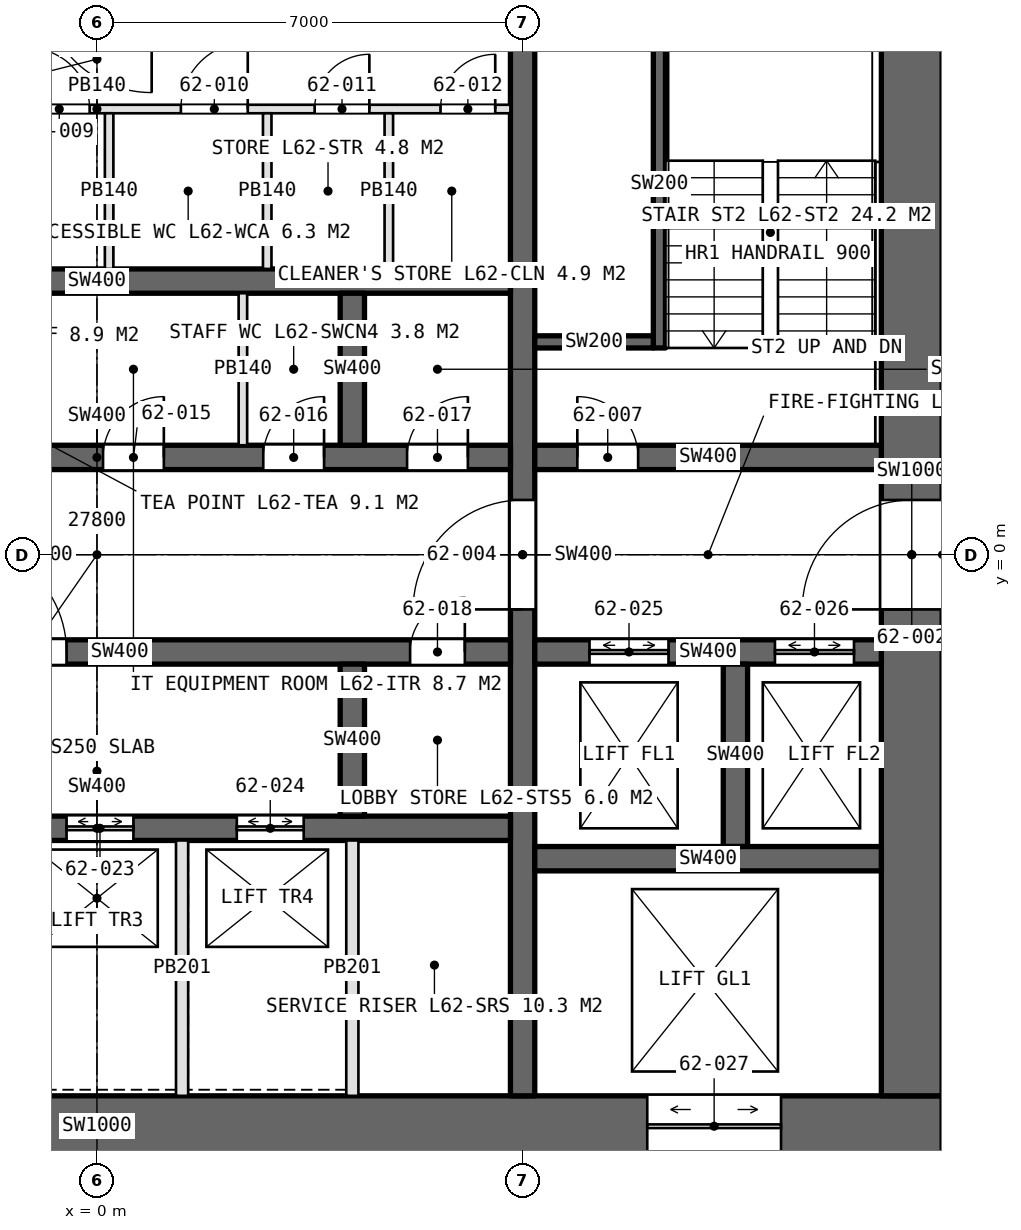
"""IFC4 building model, lengths in metres.
Left out: names, types, materials, properties, quantities, classifications, styles, units other than length and angle.
Written with IfcOpenShell. Run it as: python <this file> out.ifc"""

import sys

from ifc_helpers import new_model, si_unit, direction, frame, frame_2d, origin, place, context, subcontext, project, spatial, rectangle, extrude, element, fill, save


model = new_model("IFC4")
c1 = context("Model", 3, precision=1e-05, world=origin(), true_north=direction((0.0, 1.0)))
c2 = subcontext(c1, "Body", "Model", "MODEL_VIEW")
j1 = project(units=[si_unit("LENGTHUNIT", "METRE"), si_unit("PLANEANGLEUNIT", "RADIAN")], contexts=[c1])
p1 = place(None, origin())
s1 = spatial("IfcSite", under=j1, at=p1, CompositionType="ELEMENT")
p2 = place(p1, origin())
s2 = spatial("IfcBuilding", under=s1, at=p2, CompositionType="ELEMENT")
p3 = place(p2, frame((0.0, 0.0, 279.6)))
s3 = spatial("IfcBuildingStorey", under=s2, at=p3, CompositionType="ELEMENT", Elevation=279.6)
p4 = place(p3, frame((-13.9, -9.4, 0.0), z_axis=(0.0, 0.0, 1.0), x_axis=(1.0, 0.0, 0.0)))
e1 = element("IfcWall", 1, at=p4, inside=s3, PredefinedType="SHEAR", context=c2, shape_type="SweptSolid", body=[
    extrude(rectangle(XDim=27.8, YDim=1.0, at=frame_2d((13.9, 0.0))), origin(), (0.0, 0.0, 1.0), 4.2),
])
p5 = place(p4, frame((22.95, 0.0, 0.0)))
e2 = element("IfcOpeningElement", 2, at=p5, cuts=e1, PredefinedType="OPENING", context=c2, shape_type="SweptSolid", body=[
    extrude(rectangle(XDim=2.2, YDim=2.7, at=frame_2d((1.1, 1.35))), frame((0.0, 0.51, 0.0), z_axis=(0.0, -1.0, 0.0), x_axis=(1.0, 0.0, 0.0)), (0.0, 0.0, 1.0), 1.02),
])
p6 = place(p3, frame((13.4, -8.9, 0.0), z_axis=(0.0, 0.0, 1.0), x_axis=(0.0, 1.0, 0.0)))
e3 = element("IfcWall", 3, at=p6, inside=s3, PredefinedType="SHEAR", context=c2, shape_type="SweptSolid", body=[
    extrude(rectangle(XDim=17.8, YDim=1.0, at=frame_2d((8.9, 0.0))), origin(), (0.0, 0.0, 1.0), 4.2),
])
p7 = place(p6, frame((8.0, 0.0, 0.0)))
e4 = element("IfcOpeningElement", 4, at=p7, cuts=e3, PredefinedType="OPENING", context=c2, shape_type="SweptSolid", body=[
    extrude(rectangle(XDim=1.8, YDim=2.4, at=frame_2d((0.9, 1.2))), frame((0.0, 0.51, 0.0), z_axis=(0.0, -1.0, 0.0), x_axis=(1.0, 0.0, 0.0)), (0.0, 0.0, 1.0), 1.02),
])
p8 = place(p3, frame((7.0, -8.9, 0.0), z_axis=(0.0, 0.0, 1.0), x_axis=(0.0, 1.0, 0.0)))
e5 = element("IfcWall", 5, at=p8, inside=s3, PredefinedType="SHEAR", context=c2, shape_type="SweptSolid", body=[
    extrude(rectangle(XDim=17.8, YDim=0.4, at=frame_2d((8.9, 0.0))), origin(), (0.0, 0.0, 1.0), 4.2),
])
p9 = place(p8, frame((8.0, 0.0, 0.0)))
e6 = element("IfcOpeningElement", 6, at=p9, cuts=e5, PredefinedType="OPENING", context=c2, shape_type="SweptSolid", body=[
    extrude(rectangle(XDim=1.8, YDim=2.4, at=frame_2d((0.9, 1.2))), frame((0.0, 0.21, 0.0), z_axis=(0.0, -1.0, 0.0), x_axis=(1.0, 0.0, 0.0)), (0.0, 0.0, 1.0), 0.42),
])
p10 = place(p3, frame((-6.8, 1.6, 0.0), z_axis=(0.0, 0.0, 1.0), x_axis=(1.0, 0.0, 0.0)))
e7 = element("IfcWall", 7, at=p10, inside=s3, PredefinedType="SHEAR", context=c2, shape_type="SweptSolid", body=[
    extrude(rectangle(XDim=13.6, YDim=0.4, at=frame_2d((6.8, 0.0))), origin(), (0.0, 0.0, 1.0), 4.2),
])
p11 = place(p10, frame((0.365, 0.0, 0.0)))
e8 = element("IfcOpeningElement", 8, at=p11, cuts=e7, PredefinedType="OPENING", context=c2, shape_type="SweptSolid", body=[
    extrude(rectangle(XDim=1.0, YDim=2.4, at=frame_2d((0.5, 1.2))), frame((0.0, 0.21, 0.0), z_axis=(0.0, -1.0, 0.0), x_axis=(1.0, 0.0, 0.0)), (0.0, 0.0, 1.0), 0.42),
])
p12 = place(p10, frame((3.2, 0.0, 0.0)))
e9 = element("IfcOpeningElement", 9, at=p12, cuts=e7, PredefinedType="OPENING", context=c2, shape_type="SweptSolid", body=[
    extrude(rectangle(XDim=1.0, YDim=2.4, at=frame_2d((0.5, 1.2))), frame((0.0, 0.21, 0.0), z_axis=(0.0, -1.0, 0.0), x_axis=(1.0, 0.0, 0.0)), (0.0, 0.0, 1.0), 0.42),
])
p13 = place(p10, frame((6.9, 0.0, 0.0)))
e10 = element("IfcOpeningElement", 10, at=p13, cuts=e7, PredefinedType="OPENING", context=c2, shape_type="SweptSolid", body=[
    extrude(rectangle(XDim=1.0, YDim=2.4, at=frame_2d((0.5, 1.2))), frame((0.0, 0.21, 0.0), z_axis=(0.0, -1.0, 0.0), x_axis=(1.0, 0.0, 0.0)), (0.0, 0.0, 1.0), 0.42),
])
p14 = place(p10, frame((9.535, 0.0, 0.0)))
e11 = element("IfcOpeningElement", 11, at=p14, cuts=e7, PredefinedType="OPENING", context=c2, shape_type="SweptSolid", body=[
    extrude(rectangle(XDim=1.0, YDim=2.4, at=frame_2d((0.5, 1.2))), frame((0.0, 0.21, 0.0), z_axis=(0.0, -1.0, 0.0), x_axis=(1.0, 0.0, 0.0)), (0.0, 0.0, 1.0), 0.42),
])
p15 = place(p10, frame((11.9, 0.0, 0.0)))
e12 = element("IfcOpeningElement", 12, at=p15, cuts=e7, PredefinedType="OPENING", context=c2, shape_type="SweptSolid", body=[
    extrude(rectangle(XDim=1.0, YDim=2.4, at=frame_2d((0.5, 1.2))), frame((0.0, 0.21, 0.0), z_axis=(0.0, -1.0, 0.0), x_axis=(1.0, 0.0, 0.0)), (0.0, 0.0, 1.0), 0.42),
])
p16 = place(p3, frame((-6.8, -1.6, 0.0), z_axis=(0.0, 0.0, 1.0), x_axis=(1.0, 0.0, 0.0)))
e13 = element("IfcWall", 13, at=p16, inside=s3, PredefinedType="SHEAR", context=c2, shape_type="SweptSolid", body=[
    extrude(rectangle(XDim=13.6, YDim=0.4, at=frame_2d((6.8, 0.0))), origin(), (0.0, 0.0, 1.0), 4.2),
])
p17 = place(p16, frame((11.95, 0.0, 0.0)))
e14 = element("IfcOpeningElement", 14, at=p17, cuts=e13, PredefinedType="OPENING", context=c2, shape_type="SweptSolid", body=[
    extrude(rectangle(XDim=0.9, YDim=2.4, at=frame_2d((0.45, 1.2))), frame((0.0, 0.21, 0.0), z_axis=(0.0, -1.0, 0.0), x_axis=(1.0, 0.0, 0.0)), (0.0, 0.0, 1.0), 0.42),
])
p18 = place(p16, frame((4.5, 0.0, 0.0)))
e15 = element("IfcOpeningElement", 15, at=p18, cuts=e13, PredefinedType="OPENING", context=c2, shape_type="SweptSolid", body=[
    extrude(rectangle(XDim=1.8, YDim=2.4, at=frame_2d((0.9, 1.2))), frame((0.0, 0.21, 0.0), z_axis=(0.0, -1.0, 0.0), x_axis=(1.0, 0.0, 0.0)), (0.0, 0.0, 1.0), 0.42),
])
p19 = place(p3, frame((-6.8, 4.5, 0.0), z_axis=(0.0, 0.0, 1.0), x_axis=(1.0, 0.0, 0.0)))
e16 = element("IfcWall", 16, at=p19, inside=s3, PredefinedType="SHEAR", context=c2, shape_type="SweptSolid", body=[
    extrude(rectangle(XDim=13.6, YDim=0.4, at=frame_2d((6.8, 0.0))), origin(), (0.0, 0.0, 1.0), 4.2),
])
p20 = place(p3, frame((-6.8, -4.5, 0.0), z_axis=(0.0, 0.0, 1.0), x_axis=(1.0, 0.0, 0.0)))
e17 = element("IfcWall", 17, at=p20, inside=s3, PredefinedType="SHEAR", context=c2, shape_type="SweptSolid", body=[
    extrude(rectangle(XDim=13.6, YDim=0.4, at=frame_2d((6.8, 0.0))), origin(), (0.0, 0.0, 1.0), 4.2),
])
p21 = place(p20, frame((0.7, 0.0, 0.0)))
e18 = element("IfcOpeningElement", 18, at=p21, cuts=e17, PredefinedType="OPENING", context=c2, shape_type="SweptSolid", body=[
    extrude(rectangle(XDim=1.1, YDim=2.4, at=frame_2d((0.55, 1.2))), frame((0.0, 0.21, 0.0), z_axis=(0.0, -1.0, 0.0), x_axis=(1.0, 0.0, 0.0)), (0.0, 0.0, 1.0), 0.42),
])
p22 = place(p20, frame((3.5, 0.0, 0.0)))
e19 = element("IfcOpeningElement", 19, at=p22, cuts=e17, PredefinedType="OPENING", context=c2, shape_type="SweptSolid", body=[
    extrude(rectangle(XDim=1.1, YDim=2.4, at=frame_2d((0.55, 1.2))), frame((0.0, 0.21, 0.0), z_axis=(0.0, -1.0, 0.0), x_axis=(1.0, 0.0, 0.0)), (0.0, 0.0, 1.0), 0.42),
])
p23 = place(p20, frame((6.3, 0.0, 0.0)))
e20 = element("IfcOpeningElement", 20, at=p23, cuts=e17, PredefinedType="OPENING", context=c2, shape_type="SweptSolid", body=[
    extrude(rectangle(XDim=1.1, YDim=2.4, at=frame_2d((0.55, 1.2))), frame((0.0, 0.21, 0.0), z_axis=(0.0, -1.0, 0.0), x_axis=(1.0, 0.0, 0.0)), (0.0, 0.0, 1.0), 0.42),
])
p24 = place(p20, frame((9.1, 0.0, 0.0)))
e21 = element("IfcOpeningElement", 21, at=p24, cuts=e17, PredefinedType="OPENING", context=c2, shape_type="SweptSolid", body=[
    extrude(rectangle(XDim=1.1, YDim=2.4, at=frame_2d((0.55, 1.2))), frame((0.0, 0.21, 0.0), z_axis=(0.0, -1.0, 0.0), x_axis=(1.0, 0.0, 0.0)), (0.0, 0.0, 1.0), 0.42),
])
p25 = place(p3, frame((7.2, 1.6, 0.0), z_axis=(0.0, 0.0, 1.0), x_axis=(1.0, 0.0, 0.0)))
e22 = element("IfcWall", 22, at=p25, inside=s3, PredefinedType="SHEAR", context=c2, shape_type="SweptSolid", body=[
    extrude(rectangle(XDim=5.7, YDim=0.4, at=frame_2d((2.85, 0.0))), origin(), (0.0, 0.0, 1.0), 4.2),
])
p26 = place(p25, frame((0.7, 0.0, 0.0)))
e23 = element("IfcOpeningElement", 23, at=p26, cuts=e22, PredefinedType="OPENING", context=c2, shape_type="SweptSolid", body=[
    extrude(rectangle(XDim=1.0, YDim=2.4, at=frame_2d((0.5, 1.2))), frame((0.0, 0.21, 0.0), z_axis=(0.0, -1.0, 0.0), x_axis=(1.0, 0.0, 0.0)), (0.0, 0.0, 1.0), 0.42),
])
p27 = place(p3, frame((7.2, -1.6, 0.0), z_axis=(0.0, 0.0, 1.0), x_axis=(1.0, 0.0, 0.0)))
e24 = element("IfcWall", 24, at=p27, inside=s3, PredefinedType="SHEAR", context=c2, shape_type="SweptSolid", body=[
    extrude(rectangle(XDim=5.7, YDim=0.4, at=frame_2d((2.85, 0.0))), origin(), (0.0, 0.0, 1.0), 4.2),
])
p28 = place(p27, frame((0.9, 0.0, 0.0)))
e25 = element("IfcOpeningElement", 25, at=p28, cuts=e24, PredefinedType="OPENING", context=c2, shape_type="SweptSolid", body=[
    extrude(rectangle(XDim=1.3, YDim=2.4, at=frame_2d((0.65, 1.2))), frame((0.0, 0.21, 0.0), z_axis=(0.0, -1.0, 0.0), x_axis=(1.0, 0.0, 0.0)), (0.0, 0.0, 1.0), 0.42),
])
p29 = place(p27, frame((3.95, 0.0, 0.0)))
e26 = element("IfcOpeningElement", 26, at=p29, cuts=e24, PredefinedType="OPENING", context=c2, shape_type="SweptSolid", body=[
    extrude(rectangle(XDim=1.3, YDim=2.4, at=frame_2d((0.65, 1.2))), frame((0.0, 0.21, 0.0), z_axis=(0.0, -1.0, 0.0), x_axis=(1.0, 0.0, 0.0)), (0.0, 0.0, 1.0), 0.42),
])
p30 = place(p3, frame((10.5, -4.8, 0.0), z_axis=(0.0, 0.0, 1.0), x_axis=(0.0, 1.0, 0.0)))
e27 = element("IfcWall", 27, at=p30, inside=s3, PredefinedType="SHEAR", context=c2, shape_type="SweptSolid", body=[
    extrude(rectangle(XDim=3.0, YDim=0.4, at=frame_2d((1.5, 0.0))), origin(), (0.0, 0.0, 1.0), 4.2),
])
p31 = place(p3, frame((7.2, -5.0, 0.0), z_axis=(0.0, 0.0, 1.0), x_axis=(1.0, 0.0, 0.0)))
e28 = element("IfcWall", 28, at=p31, inside=s3, PredefinedType="SHEAR", context=c2, shape_type="SweptSolid", body=[
    extrude(rectangle(XDim=5.7, YDim=0.4, at=frame_2d((2.85, 0.0))), origin(), (0.0, 0.0, 1.0), 4.2),
])
for number, where, z_axis, x_axis in (
    (29, (4.2, 1.8, 0.0), (0.0, 0.0, 1.0), (0.0, 1.0, 0.0)),
    (30, (4.2, -4.3, 0.0), (0.0, 0.0, 1.0), (0.0, 1.0, 0.0)),
):
    element("IfcWall", number, at=place(p3, frame(where, z_axis=z_axis, x_axis=x_axis)), inside=s3, PredefinedType="SHEAR", context=c2, shape_type="SweptSolid", body=[
        extrude(rectangle(XDim=2.5, YDim=0.4, at=frame_2d((1.25, 0.0))), origin(), (0.0, 0.0, 1.0), 4.2),
    ])
p32 = place(p3, frame((-6.8, 7.33, 0.0), z_axis=(0.0, 0.0, 1.0), x_axis=(1.0, 0.0, 0.0)))
e31 = element("IfcWall", 31, at=p32, inside=s3, PredefinedType="PARTITIONING", context=c2, shape_type="SweptSolid", body=[
    extrude(rectangle(XDim=13.6, YDim=0.14, at=frame_2d((6.8, 0.0))), origin(), (0.0, 0.0, 1.0), 3.95),
])
p33 = place(p32, frame((2.08, 0.0, 0.0)))
e32 = element("IfcOpeningElement", 32, at=p33, cuts=e31, PredefinedType="OPENING", context=c2, shape_type="SweptSolid", body=[
    extrude(rectangle(XDim=1.0, YDim=2.4, at=frame_2d((0.5, 1.2))), frame((0.0, 0.08, 0.0), z_axis=(0.0, -1.0, 0.0), x_axis=(1.0, 0.0, 0.0)), (0.0, 0.0, 1.0), 0.16),
])
p34 = place(p32, frame((5.68, 0.0, 0.0)))
e33 = element("IfcOpeningElement", 33, at=p34, cuts=e31, PredefinedType="OPENING", context=c2, shape_type="SweptSolid", body=[
    extrude(rectangle(XDim=1.0, YDim=2.4, at=frame_2d((0.5, 1.2))), frame((0.0, 0.08, 0.0), z_axis=(0.0, -1.0, 0.0), x_axis=(1.0, 0.0, 0.0)), (0.0, 0.0, 1.0), 0.16),
])
p35 = place(p32, frame((8.18, 0.0, 0.0)))
e34 = element("IfcOpeningElement", 34, at=p35, cuts=e31, PredefinedType="OPENING", context=c2, shape_type="SweptSolid", body=[
    extrude(rectangle(XDim=1.1, YDim=2.4, at=frame_2d((0.55, 1.2))), frame((0.0, 0.08, 0.0), z_axis=(0.0, -1.0, 0.0), x_axis=(1.0, 0.0, 0.0)), (0.0, 0.0, 1.0), 0.16),
])
p36 = place(p32, frame((10.38, 0.0, 0.0)))
e35 = element("IfcOpeningElement", 35, at=p36, cuts=e31, PredefinedType="OPENING", context=c2, shape_type="SweptSolid", body=[
    extrude(rectangle(XDim=0.9, YDim=2.4, at=frame_2d((0.45, 1.2))), frame((0.0, 0.08, 0.0), z_axis=(0.0, -1.0, 0.0), x_axis=(1.0, 0.0, 0.0)), (0.0, 0.0, 1.0), 0.16),
])
p37 = place(p32, frame((12.45, 0.0, 0.0)))
e36 = element("IfcOpeningElement", 36, at=p37, cuts=e31, PredefinedType="OPENING", context=c2, shape_type="SweptSolid", body=[
    extrude(rectangle(XDim=0.9, YDim=2.4, at=frame_2d((0.45, 1.2))), frame((0.0, 0.08, 0.0), z_axis=(0.0, -1.0, 0.0), x_axis=(1.0, 0.0, 0.0)), (0.0, 0.0, 1.0), 0.16),
])
for number, where, z_axis, x_axis in (
    (37, (0.2, 4.7, 0.0), (0.0, 0.0, 1.0), (0.0, 1.0, 0.0)),
    (38, (2.8, 4.7, 0.0), (0.0, 0.0, 1.0), (0.0, 1.0, 0.0)),
    (39, (4.8, 4.7, 0.0), (0.0, 0.0, 1.0), (0.0, 1.0, 0.0)),
):
    element("IfcWall", number, at=place(p3, frame(where, z_axis=z_axis, x_axis=x_axis)), inside=s3, PredefinedType="PARTITIONING", context=c2, shape_type="SweptSolid", body=[
        extrude(rectangle(XDim=2.56, YDim=0.14, at=frame_2d((1.28, 0.0))), origin(), (0.0, 0.0, 1.0), 3.95),
    ])
p38 = place(p3, frame((2.4, 1.8, 0.0), z_axis=(0.0, 0.0, 1.0), x_axis=(0.0, 1.0, 0.0)))
e40 = element("IfcWall", 40, at=p38, inside=s3, PredefinedType="PARTITIONING", context=c2, shape_type="SweptSolid", body=[
    extrude(rectangle(XDim=2.5, YDim=0.14, at=frame_2d((1.25, 0.0))), origin(), (0.0, 0.0, 1.0), 3.95),
])
for number, where, z_axis, x_axis in (
    (41, (1.4, -4.7, 0.0), (0.0, 0.0, 1.0), (0.0, -1.0, 0.0)),
    (42, (4.2, -4.7, 0.0), (0.0, 0.0, 1.0), (0.0, -1.0, 0.0)),
):
    element("IfcWall", number, at=place(p3, frame(where, z_axis=z_axis, x_axis=x_axis)), inside=s3, PredefinedType="PARTITIONING", context=c2, shape_type="SweptSolid", body=[
        extrude(rectangle(XDim=4.2, YDim=0.2, at=frame_2d((2.1, 0.0))), origin(), (0.0, 0.0, 1.0), 4.2),
    ])
p39 = place(p3, frame((9.25, 3.4, 0.0), z_axis=(0.0, 0.0, 1.0), x_axis=(0.0, 1.0, 0.0)))
e43 = element("IfcWall", 43, at=p39, inside=s3, PredefinedType="SOLIDWALL", context=c2, shape_type="SweptSolid", body=[
    extrude(rectangle(XDim=5.4, YDim=0.2, at=frame_2d((2.7, 0.0))), origin(), (0.0, 0.0, 1.0), 4.2),
])
p40 = place(p3, frame((9.15, 3.5, 0.0), z_axis=(0.0, 0.0, 1.0), x_axis=(-1.0, 0.0, 0.0)))
e44 = element("IfcWall", 44, at=p40, inside=s3, PredefinedType="SOLIDWALL", context=c2, shape_type="SweptSolid", body=[
    extrude(rectangle(XDim=1.95, YDim=0.2, at=frame_2d((0.975, 0.0))), origin(), (0.0, 0.0, 1.0), 4.2),
])
p41 = place(p7, origin())
e45 = element("IfcDoor", 45, at=p41, inside=s3, OperationType="DOUBLE_DOOR_SINGLE_SWING", PredefinedType="DOOR", context=c2, shape_type="SweptSolid", body=[
    extrude(rectangle(XDim=1.8, YDim=2.4, at=frame_2d((0.9, 1.2))), frame((0.0, 0.025, 0.0), z_axis=(0.0, -1.0, 0.0), x_axis=(1.0, 0.0, 0.0)), (0.0, 0.0, 1.0), 0.05),
])
fill(e4, e45)
p42 = place(p9, origin())
e46 = element("IfcDoor", 46, at=p42, inside=s3, OperationType="DOUBLE_DOOR_SINGLE_SWING", PredefinedType="DOOR", context=c2, shape_type="SweptSolid", body=[
    extrude(rectangle(XDim=1.8, YDim=2.4, at=frame_2d((0.9, 1.2))), frame((0.0, 0.025, 0.0), z_axis=(0.0, -1.0, 0.0), x_axis=(1.0, 0.0, 0.0)), (0.0, 0.0, 1.0), 0.05),
])
fill(e6, e46)
p43 = place(p26, origin())
e47 = element("IfcDoor", 47, at=p43, inside=s3, OperationType="SINGLE_SWING_LEFT", PredefinedType="DOOR", context=c2, shape_type="SweptSolid", body=[
    extrude(rectangle(XDim=1.0, YDim=2.4, at=frame_2d((0.5, 1.2))), frame((0.0, 0.025, 0.0), z_axis=(0.0, -1.0, 0.0), x_axis=(1.0, 0.0, 0.0)), (0.0, 0.0, 1.0), 0.05),
])
fill(e23, e47)
p44 = place(p34, origin())
e48 = element("IfcDoor", 48, at=p44, inside=s3, OperationType="SINGLE_SWING_LEFT", PredefinedType="DOOR", context=c2, shape_type="SweptSolid", body=[
    extrude(rectangle(XDim=1.0, YDim=2.4, at=frame_2d((0.5, 1.2))), frame((0.0, 0.025, 0.0), z_axis=(0.0, -1.0, 0.0), x_axis=(1.0, 0.0, 0.0)), (0.0, 0.0, 1.0), 0.05),
])
fill(e33, e48)
p45 = place(p35, origin())
e49 = element("IfcDoor", 49, at=p45, inside=s3, OperationType="SINGLE_SWING_RIGHT", PredefinedType="DOOR", context=c2, shape_type="SweptSolid", body=[
    extrude(rectangle(XDim=1.1, YDim=2.4, at=frame_2d((0.55, 1.2))), frame((0.0, 0.025, 0.0), z_axis=(0.0, -1.0, 0.0), x_axis=(1.0, 0.0, 0.0)), (0.0, 0.0, 1.0), 0.05),
])
fill(e34, e49)
p46 = place(p36, origin())
e50 = element("IfcDoor", 50, at=p46, inside=s3, OperationType="SINGLE_SWING_RIGHT", PredefinedType="DOOR", context=c2, shape_type="SweptSolid", body=[
    extrude(rectangle(XDim=0.9, YDim=2.4, at=frame_2d((0.45, 1.2))), frame((0.0, 0.025, 0.0), z_axis=(0.0, -1.0, 0.0), x_axis=(1.0, 0.0, 0.0)), (0.0, 0.0, 1.0), 0.05),
])
fill(e35, e50)
p47 = place(p37, origin())
e51 = element("IfcDoor", 51, at=p47, inside=s3, OperationType="SINGLE_SWING_RIGHT", PredefinedType="DOOR", context=c2, shape_type="SweptSolid", body=[
    extrude(rectangle(XDim=0.9, YDim=2.4, at=frame_2d((0.45, 1.2))), frame((0.0, 0.025, 0.0), z_axis=(0.0, -1.0, 0.0), x_axis=(1.0, 0.0, 0.0)), (0.0, 0.0, 1.0), 0.05),
])
fill(e36, e51)
p48 = place(p13, origin())
e52 = element("IfcDoor", 52, at=p48, inside=s3, OperationType="SINGLE_SWING_RIGHT", PredefinedType="DOOR", context=c2, shape_type="SweptSolid", body=[
    extrude(rectangle(XDim=1.0, YDim=2.4, at=frame_2d((0.5, 1.2))), frame((0.0, 0.025, 0.0), z_axis=(0.0, -1.0, 0.0), x_axis=(1.0, 0.0, 0.0)), (0.0, 0.0, 1.0), 0.05),
])
fill(e10, e52)
p49 = place(p14, origin())
e53 = element("IfcDoor", 53, at=p49, inside=s3, OperationType="SINGLE_SWING_RIGHT", PredefinedType="DOOR", context=c2, shape_type="SweptSolid", body=[
    extrude(rectangle(XDim=1.0, YDim=2.4, at=frame_2d((0.5, 1.2))), frame((0.0, 0.025, 0.0), z_axis=(0.0, -1.0, 0.0), x_axis=(1.0, 0.0, 0.0)), (0.0, 0.0, 1.0), 0.05),
])
fill(e11, e53)
p50 = place(p15, origin())
e54 = element("IfcDoor", 54, at=p50, inside=s3, OperationType="SINGLE_SWING_RIGHT", PredefinedType="DOOR", context=c2, shape_type="SweptSolid", body=[
    extrude(rectangle(XDim=1.0, YDim=2.4, at=frame_2d((0.5, 1.2))), frame((0.0, 0.025, 0.0), z_axis=(0.0, -1.0, 0.0), x_axis=(1.0, 0.0, 0.0)), (0.0, 0.0, 1.0), 0.05),
])
fill(e12, e54)
p51 = place(p17, origin())
e55 = element("IfcDoor", 55, at=p51, inside=s3, OperationType="SINGLE_SWING_RIGHT", PredefinedType="DOOR", context=c2, shape_type="SweptSolid", body=[
    extrude(rectangle(XDim=0.9, YDim=2.4, at=frame_2d((0.45, 1.2))), frame((0.0, 0.025, 0.0), z_axis=(0.0, -1.0, 0.0), x_axis=(1.0, 0.0, 0.0)), (0.0, 0.0, 1.0), 0.05),
])
fill(e14, e55)
p52 = place(p18, origin())
e56 = element("IfcDoor", 56, at=p52, inside=s3, OperationType="DOUBLE_DOOR_SINGLE_SWING", PredefinedType="DOOR", context=c2, shape_type="SweptSolid", body=[
    extrude(rectangle(XDim=1.8, YDim=2.4, at=frame_2d((0.9, 1.2))), frame((0.0, 0.025, 0.0), z_axis=(0.0, -1.0, 0.0), x_axis=(1.0, 0.0, 0.0)), (0.0, 0.0, 1.0), 0.05),
])
fill(e15, e56)
p53 = place(p23, origin())
e57 = element("IfcDoor", 57, at=p53, inside=s3, OperationType="DOUBLE_DOOR_SLIDING", PredefinedType="DOOR", context=c2, shape_type="SweptSolid", body=[
    extrude(rectangle(XDim=1.1, YDim=2.4, at=frame_2d((0.55, 1.2))), frame((0.0, 0.025, 0.0), z_axis=(0.0, -1.0, 0.0), x_axis=(1.0, 0.0, 0.0)), (0.0, 0.0, 1.0), 0.05),
])
fill(e20, e57)
p54 = place(p24, origin())
e58 = element("IfcDoor", 58, at=p54, inside=s3, OperationType="DOUBLE_DOOR_SLIDING", PredefinedType="DOOR", context=c2, shape_type="SweptSolid", body=[
    extrude(rectangle(XDim=1.1, YDim=2.4, at=frame_2d((0.55, 1.2))), frame((0.0, 0.025, 0.0), z_axis=(0.0, -1.0, 0.0), x_axis=(1.0, 0.0, 0.0)), (0.0, 0.0, 1.0), 0.05),
])
fill(e21, e58)
p55 = place(p28, origin())
e59 = element("IfcDoor", 59, at=p55, inside=s3, OperationType="DOUBLE_DOOR_SLIDING", PredefinedType="DOOR", context=c2, shape_type="SweptSolid", body=[
    extrude(rectangle(XDim=1.3, YDim=2.4, at=frame_2d((0.65, 1.2))), frame((0.0, 0.025, 0.0), z_axis=(0.0, -1.0, 0.0), x_axis=(1.0, 0.0, 0.0)), (0.0, 0.0, 1.0), 0.05),
])
fill(e25, e59)
p56 = place(p29, origin())
e60 = element("IfcDoor", 60, at=p56, inside=s3, OperationType="DOUBLE_DOOR_SLIDING", PredefinedType="DOOR", context=c2, shape_type="SweptSolid", body=[
    extrude(rectangle(XDim=1.3, YDim=2.4, at=frame_2d((0.65, 1.2))), frame((0.0, 0.025, 0.0), z_axis=(0.0, -1.0, 0.0), x_axis=(1.0, 0.0, 0.0)), (0.0, 0.0, 1.0), 0.05),
])
fill(e26, e60)
p57 = place(p5, origin())
e61 = element("IfcDoor", 61, at=p57, inside=s3, OperationType="DOUBLE_DOOR_SLIDING", PredefinedType="DOOR", context=c2, shape_type="SweptSolid", body=[
    extrude(rectangle(XDim=2.2, YDim=2.7, at=frame_2d((1.1, 1.35))), frame((0.0, 0.025, 0.0), z_axis=(0.0, -1.0, 0.0), x_axis=(1.0, 0.0, 0.0)), (0.0, 0.0, 1.0), 0.05),
])
fill(e2, e61)
save(model, sys.argv[1])
